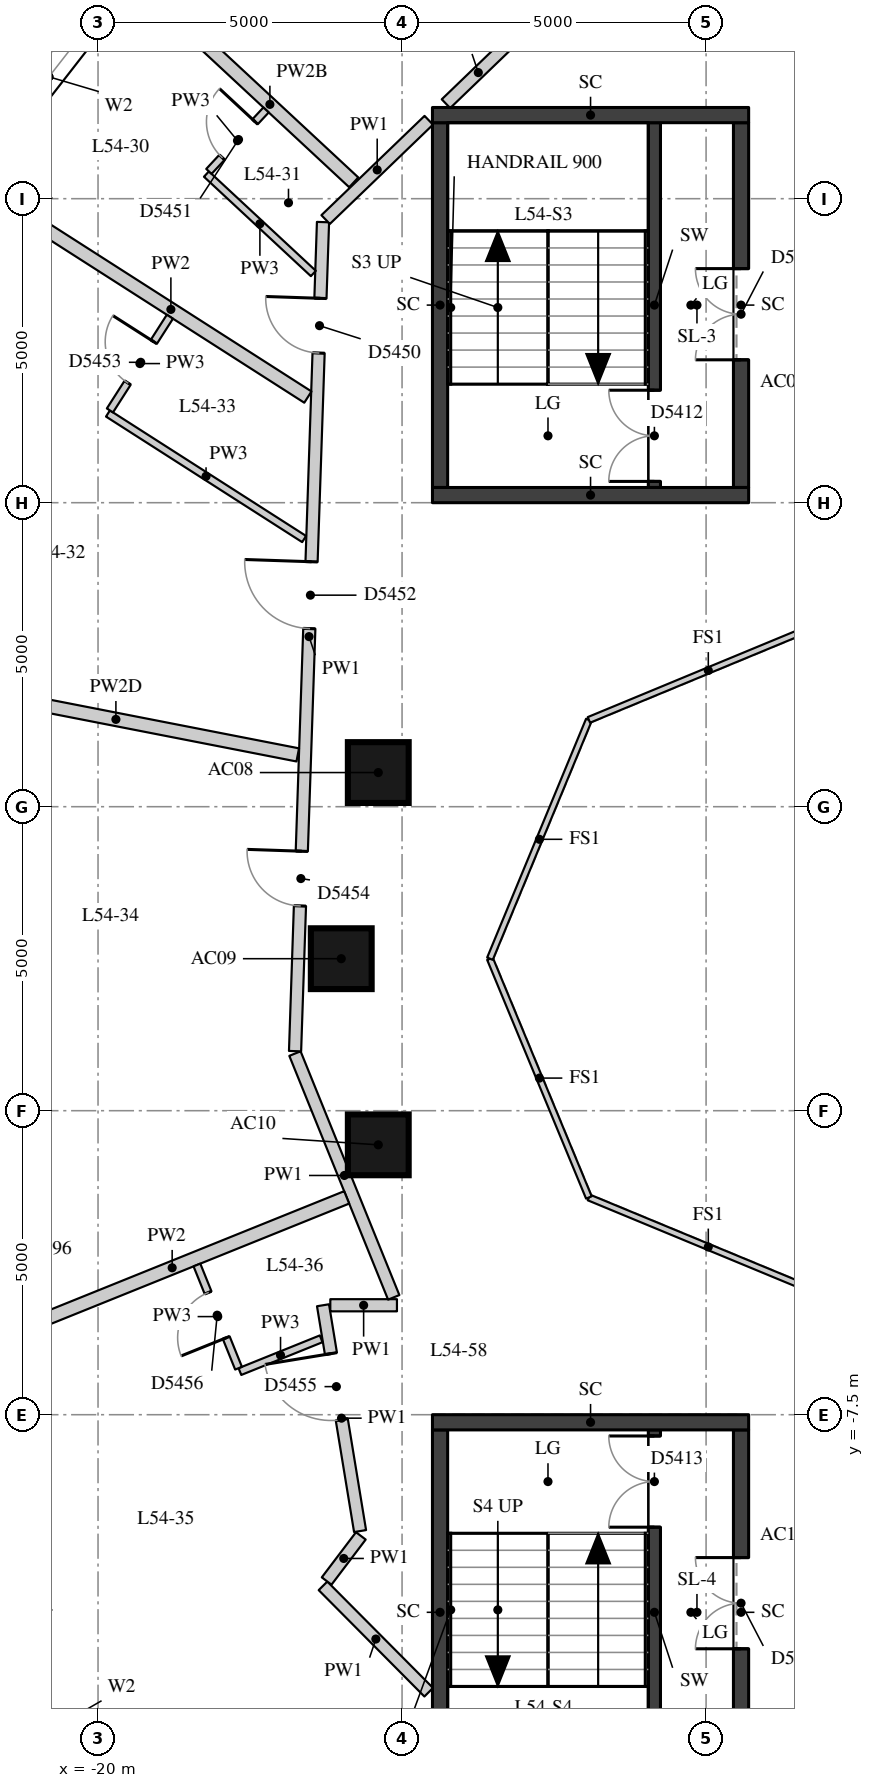
"""IFC4 building model, lengths in metres.
Left out: names, types, materials, properties, quantities, classifications, styles, units other than length and angle.
Written with IfcOpenShell. Run it as: python <this file> out.ifc"""

import sys

from ifc_helpers import new_model, si_unit, direction, frame, frame_2d, origin, origin_2d, place, context, subcontext, project, spatial, rectangle, extrude, element, fill, save


model = new_model("IFC4")
c1 = context("Model", 3, precision=1e-05, world=origin(), true_north=direction((0.0, 1.0)))
c2 = subcontext(c1, "Body", "Model", "MODEL_VIEW")
j1 = project(units=[si_unit("LENGTHUNIT", "METRE"), si_unit("PLANEANGLEUNIT", "RADIAN")], contexts=[c1])
p1 = place(None, origin())
s1 = spatial("IfcSite", under=j1, at=p1, CompositionType="ELEMENT")
p2 = place(p1, origin())
s2 = spatial("IfcBuilding", under=s1, at=p2, CompositionType="ELEMENT")
p3 = place(p2, frame((0.0, 0.0, 192.5)))
s3 = spatial("IfcBuildingStorey", under=s2, at=p3, CompositionType="ELEMENT", Elevation=192.5)
for number, where, z_axis, x_axis in (
    (1, (-15.391, 3.062, 0.0), (0.0, 0.0, 1.0), (1.0, 0.0, 0.0)),
    (2, (-16.0, 0.0, 0.0), (0.0, 0.0, 1.0), (1.0, 0.0, 0.0)),
    (3, (-15.391, -3.062, 0.0), (0.0, 0.0, 1.0), (1.0, 0.0, 0.0)),
):
    element("IfcColumn", number, at=place(p3, frame(where, z_axis=z_axis, x_axis=x_axis)), inside=s3, PredefinedType="COLUMN", context=c2, shape_type="SweptSolid", body=[
        extrude(rectangle(XDim=1.0, YDim=1.0, at=origin_2d()), origin(), (0.0, 0.0, 1.0), 3.3),
    ])
p4 = place(p3, frame((-19.751, 15.861, 0.0), z_axis=(0.0, 0.0, 1.0), x_axis=(-0.614220816451, -0.789134201919, 0.0)))
e4 = element("IfcWall", 4, at=p4, inside=s3, PredefinedType="SOLIDWALL", context=c2, shape_type="SweptSolid", body=[
    extrude(rectangle(XDim=3.438, YDim=0.45, at=frame_2d((1.719, 0.0))), origin(), (0.0, 0.0, 1.0), 3.02),
])
p5 = place(p4, frame((0.719, 0.0, 0.4)))
e5 = element("IfcOpeningElement", 5, at=p5, cuts=e4, PredefinedType="OPENING", context=c2, shape_type="SweptSolid", body=[
    extrude(rectangle(XDim=2.0, YDim=1.75, at=frame_2d((1.0, 0.875))), frame((0.0, 0.235, 0.0), z_axis=(0.0, -1.0, 0.0), x_axis=(1.0, 0.0, 0.0)), (0.0, 0.0, 1.0), 0.47),
])
p6 = place(p3, frame((-21.863, -11.348, 0.0), z_axis=(0.0, 0.0, 1.0), x_axis=(0.614255239631, -0.789107407509, 0.0)))
e6 = element("IfcWall", 6, at=p6, inside=s3, PredefinedType="SOLIDWALL", context=c2, shape_type="SweptSolid", body=[
    extrude(rectangle(XDim=3.438, YDim=0.45, at=frame_2d((1.719, 0.0))), origin(), (0.0, 0.0, 1.0), 3.02),
])
p7 = place(p6, frame((0.719, 0.0, 0.4)))
e7 = element("IfcOpeningElement", 7, at=p7, cuts=e6, PredefinedType="OPENING", context=c2, shape_type="SweptSolid", body=[
    extrude(rectangle(XDim=2.0, YDim=1.75, at=frame_2d((1.0, 0.875))), frame((0.0, 0.235, 0.0), z_axis=(0.0, -1.0, 0.0), x_axis=(1.0, 0.0, 0.0)), (0.0, 0.0, 1.0), 0.47),
])
p8 = place(p3, frame((-10.85, 7.75, 0.0), z_axis=(0.0, 0.0, 1.0), x_axis=(0.0, 1.0, 0.0)))
e8 = element("IfcWall", 8, at=p8, inside=s3, PredefinedType="SHEAR", context=c2, shape_type="SweptSolid", body=[
    extrude(rectangle(XDim=6.0, YDim=0.2, at=frame_2d((3.0, 0.0))), origin(), (0.0, 0.0, 1.0), 3.02),
])
p9 = place(p8, frame((0.1, 0.0, 0.0)))
e9 = element("IfcOpeningElement", 9, at=p9, cuts=e8, PredefinedType="OPENING", context=c2, shape_type="SweptSolid", body=[
    extrude(rectangle(XDim=1.5, YDim=2.1, at=frame_2d((0.75, 1.05))), frame((0.0, 0.11, 0.0), z_axis=(0.0, -1.0, 0.0), x_axis=(1.0, 0.0, 0.0)), (0.0, 0.0, 1.0), 0.22),
])
p10 = place(p3, frame((-10.85, -13.75, 0.0), z_axis=(0.0, 0.0, 1.0), x_axis=(0.0, 1.0, 0.0)))
e10 = element("IfcWall", 10, at=p10, inside=s3, PredefinedType="SHEAR", context=c2, shape_type="SweptSolid", body=[
    extrude(rectangle(XDim=6.0, YDim=0.2, at=frame_2d((3.0, 0.0))), origin(), (0.0, 0.0, 1.0), 3.02),
])
p11 = place(p10, frame((4.4, 0.0, 0.0)))
e11 = element("IfcOpeningElement", 11, at=p11, cuts=e10, PredefinedType="OPENING", context=c2, shape_type="SweptSolid", body=[
    extrude(rectangle(XDim=1.5, YDim=2.1, at=frame_2d((0.75, 1.05))), frame((0.0, 0.11, 0.0), z_axis=(0.0, -1.0, 0.0), x_axis=(1.0, 0.0, 0.0)), (0.0, 0.0, 1.0), 0.22),
])
p12 = place(p3, frame((-14.375, 7.75, -0.28), z_axis=(0.0, 0.0, 1.0), x_axis=(0.0, 1.0, 0.0)))
e12 = element("IfcWall", 12, at=p12, inside=s3, PredefinedType="SHEAR", context=c2, shape_type="SweptSolid", body=[
    extrude(rectangle(XDim=6.0, YDim=0.25, at=frame_2d((3.0, 0.0))), origin(), (0.0, 0.0, 1.0), 3.3),
])
p13 = place(p3, frame((-9.425, 7.75, -0.28), z_axis=(0.0, 0.0, 1.0), x_axis=(0.0, 1.0, 0.0)))
e13 = element("IfcWall", 13, at=p13, inside=s3, PredefinedType="SHEAR", context=c2, shape_type="SweptSolid", body=[
    extrude(rectangle(XDim=6.0, YDim=0.25, at=frame_2d((3.0, 0.0))), origin(), (0.0, 0.0, 1.0), 3.3),
])
p14 = place(p13, frame((2.1, 0.0, 0.28)))
e14 = element("IfcOpeningElement", 14, at=p14, cuts=e13, PredefinedType="OPENING", context=c2, shape_type="SweptSolid", body=[
    extrude(rectangle(XDim=1.5, YDim=2.1, at=frame_2d((0.75, 1.05))), frame((0.0, 0.135, 0.0), z_axis=(0.0, -1.0, 0.0), x_axis=(1.0, 0.0, 0.0)), (0.0, 0.0, 1.0), 0.27),
])
for number, where, z_axis, x_axis in (
    (15, (-14.5, 13.875, -0.28), (0.0, 0.0, 1.0), (1.0, 0.0, 0.0)),
    (16, (-14.5, 7.625, -0.28), (0.0, 0.0, 1.0), (1.0, 0.0, 0.0)),
):
    element("IfcWall", number, at=place(p3, frame(where, z_axis=z_axis, x_axis=x_axis)), inside=s3, PredefinedType="SHEAR", context=c2, shape_type="SweptSolid", body=[
        extrude(rectangle(XDim=5.2, YDim=0.25, at=frame_2d((2.6, 0.0))), origin(), (0.0, 0.0, 1.0), 3.3),
    ])
p15 = place(p3, frame((-14.375, -13.75, -0.28), z_axis=(0.0, 0.0, 1.0), x_axis=(0.0, 1.0, 0.0)))
e17 = element("IfcWall", 17, at=p15, inside=s3, PredefinedType="SHEAR", context=c2, shape_type="SweptSolid", body=[
    extrude(rectangle(XDim=6.0, YDim=0.25, at=frame_2d((3.0, 0.0))), origin(), (0.0, 0.0, 1.0), 3.3),
])
p16 = place(p3, frame((-9.425, -13.75, -0.28), z_axis=(0.0, 0.0, 1.0), x_axis=(0.0, 1.0, 0.0)))
e18 = element("IfcWall", 18, at=p16, inside=s3, PredefinedType="SHEAR", context=c2, shape_type="SweptSolid", body=[
    extrude(rectangle(XDim=6.0, YDim=0.25, at=frame_2d((3.0, 0.0))), origin(), (0.0, 0.0, 1.0), 3.3),
])
p17 = place(p16, frame((2.4, 0.0, 0.28)))
e19 = element("IfcOpeningElement", 19, at=p17, cuts=e18, PredefinedType="OPENING", context=c2, shape_type="SweptSolid", body=[
    extrude(rectangle(XDim=1.5, YDim=2.1, at=frame_2d((0.75, 1.05))), frame((0.0, 0.135, 0.0), z_axis=(0.0, -1.0, 0.0), x_axis=(1.0, 0.0, 0.0)), (0.0, 0.0, 1.0), 0.27),
])
p18 = place(p3, frame((-14.5, -7.625, -0.28), z_axis=(0.0, 0.0, 1.0), x_axis=(1.0, 0.0, 0.0)))
e20 = element("IfcWall", 20, at=p18, inside=s3, PredefinedType="SHEAR", context=c2, shape_type="SweptSolid", body=[
    extrude(rectangle(XDim=5.2, YDim=0.25, at=frame_2d((2.6, 0.0))), origin(), (0.0, 0.0, 1.0), 3.3),
])
p19 = place(p3, frame((-14.562, -12.064, 0.0), z_axis=(0.0, 0.0, 1.0), x_axis=(-0.704826289083, 0.709379942074, 0.0)))
e21 = element("IfcWall", 21, at=p19, inside=s3, PredefinedType="PARTITIONING", context=c2, shape_type="SweptSolid", body=[
    extrude(rectangle(XDim=2.466, YDim=0.2, at=frame_2d((1.233, 0.0))), origin(), (0.0, 0.0, 1.0), 3.02),
])
p20 = place(p3, frame((-16.24, -10.236, 0.0), z_axis=(0.0, 0.0, 1.0), x_axis=(0.60389301212, 0.797065386222, 0.0)))
e22 = element("IfcWall", 22, at=p20, inside=s3, PredefinedType="PARTITIONING", context=c2, shape_type="SweptSolid", body=[
    extrude(rectangle(XDim=0.931, YDim=0.2, at=frame_2d((0.466, 0.0))), origin(), (0.0, 0.0, 1.0), 3.02),
])
p21 = place(p3, frame((-15.69, -9.414, 0.0), z_axis=(0.0, 0.0, 1.0), x_axis=(-0.161968669214, 0.986795900981, 0.0)))
e23 = element("IfcWall", 23, at=p21, inside=s3, PredefinedType="PARTITIONING", context=c2, shape_type="SweptSolid", body=[
    extrude(rectangle(XDim=3.764, YDim=0.2, at=frame_2d((1.882, 0.0))), origin(), (0.0, 0.0, 1.0), 3.02),
])
p22 = place(p21, frame((1.858, 0.0, 0.0)))
e24 = element("IfcOpeningElement", 24, at=p22, cuts=e23, PredefinedType="OPENING", context=c2, shape_type="SweptSolid", body=[
    extrude(rectangle(XDim=1.1, YDim=2.1, at=frame_2d((0.55, 1.05))), frame((0.0, 0.11, 0.0), z_axis=(0.0, -1.0, 0.0), x_axis=(1.0, 0.0, 0.0)), (0.0, 0.0, 1.0), 0.22),
])
p23 = place(p3, frame((-16.18, -5.7, 0.0), z_axis=(0.0, 0.0, 1.0), x_axis=(1.0, 0.0, 0.0)))
e25 = element("IfcWall", 25, at=p23, inside=s3, PredefinedType="PARTITIONING", context=c2, shape_type="SweptSolid", body=[
    extrude(rectangle(XDim=1.096, YDim=0.2, at=frame_2d((0.548, 0.0))), origin(), (0.0, 0.0, 1.0), 3.02),
])
p24 = place(p3, frame((-15.137, -5.57, 0.0), z_axis=(0.0, 0.0, 1.0), x_axis=(-0.375464059939, 0.926836954213, 0.0)))
e26 = element("IfcWall", 26, at=p24, inside=s3, PredefinedType="PARTITIONING", context=c2, shape_type="SweptSolid", body=[
    extrude(rectangle(XDim=4.326, YDim=0.2, at=frame_2d((2.163, 0.0))), origin(), (0.0, 0.0, 1.0), 3.02),
])
p25 = place(p3, frame((-16.76, -1.521, 0.0), z_axis=(0.0, 0.0, 1.0), x_axis=(0.033695560079, 0.999432143385, 0.0)))
e27 = element("IfcWall", 27, at=p25, inside=s3, PredefinedType="PARTITIONING", context=c2, shape_type="SweptSolid", body=[
    extrude(rectangle(XDim=13.643, YDim=0.2, at=frame_2d((6.822, 0.0))), origin(), (0.0, 0.0, 1.0), 3.02),
])
p26 = place(p25, frame((11.489, 0.0, 0.0)))
e28 = element("IfcOpeningElement", 28, at=p26, cuts=e27, PredefinedType="OPENING", context=c2, shape_type="SweptSolid", body=[
    extrude(rectangle(XDim=0.9, YDim=2.1, at=frame_2d((0.45, 1.05))), frame((0.0, 0.11, 0.0), z_axis=(0.0, -1.0, 0.0), x_axis=(1.0, 0.0, 0.0)), (0.0, 0.0, 1.0), 0.22),
])
p27 = place(p25, frame((6.954, 0.0, 0.0)))
e29 = element("IfcOpeningElement", 29, at=p27, cuts=e27, PredefinedType="OPENING", context=c2, shape_type="SweptSolid", body=[
    extrude(rectangle(XDim=1.1, YDim=2.1, at=frame_2d((0.55, 1.05))), frame((0.0, 0.11, 0.0), z_axis=(0.0, -1.0, 0.0), x_axis=(1.0, 0.0, 0.0)), (0.0, 0.0, 1.0), 0.22),
])
p28 = place(p25, frame((2.39, 0.0, 0.0)))
e30 = element("IfcOpeningElement", 30, at=p28, cuts=e27, PredefinedType="OPENING", context=c2, shape_type="SweptSolid", body=[
    extrude(rectangle(XDim=0.9, YDim=2.1, at=frame_2d((0.45, 1.05))), frame((0.0, 0.11, 0.0), z_axis=(0.0, -1.0, 0.0), x_axis=(1.0, 0.0, 0.0)), (0.0, 0.0, 1.0), 0.22),
])
p29 = place(p3, frame((-16.257, 12.157, 0.0), z_axis=(0.0, 0.0, 1.0), x_axis=(0.720356671174, 0.693603825174, 0.0)))
e31 = element("IfcWall", 31, at=p29, inside=s3, PredefinedType="PARTITIONING", context=c2, shape_type="SweptSolid", body=[
    extrude(rectangle(XDim=2.354, YDim=0.2, at=frame_2d((1.177, 0.0))), origin(), (0.0, 0.0, 1.0), 3.02),
])
p30 = place(p3, frame((-14.278, 14.062, 0.0), z_axis=(0.0, 0.0, 1.0), x_axis=(0.720213092954, 0.693752910435, 0.0)))
e32 = element("IfcWall", 32, at=p30, inside=s3, PredefinedType="PARTITIONING", context=c2, shape_type="SweptSolid", body=[
    extrude(rectangle(XDim=1.476, YDim=0.2, at=frame_2d((0.738, 0.0))), origin(), (0.0, 0.0, 1.0), 3.02),
])
p31 = place(p3, frame((-18.553, 15.334, 0.0), z_axis=(0.0, 0.0, 1.0), x_axis=(0.732303975018, -0.680977891105, 0.0)))
e33 = element("IfcWall", 33, at=p31, inside=s3, PredefinedType="PARTITIONING", context=c2, shape_type="SweptSolid", body=[
    extrude(rectangle(XDim=3.767, YDim=0.22, at=frame_2d((1.884, 0.0))), origin(), (0.0, 0.0, 1.0), 2.57),
])
p32 = place(p3, frame((-21.055, 12.121, 0.0), z_axis=(0.0, 0.0, 1.0), x_axis=(0.842281345898, -0.539038156675, 0.0)))
e34 = element("IfcWall", 34, at=p32, inside=s3, PredefinedType="PARTITIONING", context=c2, shape_type="SweptSolid", body=[
    extrude(rectangle(XDim=5.35, YDim=0.22, at=frame_2d((2.675, 0.0))), origin(), (0.0, 0.0, 1.0), 3.02),
])
p33 = place(p3, frame((-22.697, 4.521, 0.0), z_axis=(0.0, 0.0, 1.0), x_axis=(0.981441525081, -0.19176165635, 0.0)))
e35 = element("IfcWall", 35, at=p33, inside=s3, PredefinedType="PARTITIONING", context=c2, shape_type="SweptSolid", body=[
    extrude(rectangle(XDim=6.094, YDim=0.22, at=frame_2d((3.047, 0.0))), origin(), (0.0, 0.0, 1.0), 2.47),
])
p34 = place(p3, frame((-21.651, -6.241, 0.0), z_axis=(0.0, 0.0, 1.0), x_axis=(0.927381885483, 0.374116076208, 0.0)))
e36 = element("IfcWall", 36, at=p34, inside=s3, PredefinedType="PARTITIONING", context=c2, shape_type="SweptSolid", body=[
    extrude(rectangle(XDim=6.19, YDim=0.22, at=frame_2d((3.095, 0.0))), origin(), (0.0, 0.0, 1.0), 3.02),
])
p35 = place(p3, frame((-16.459, 11.27, 0.0), z_axis=(0.0, 0.0, 1.0), x_axis=(-0.732311710068, 0.68096957296, 0.0)))
e37 = element("IfcWall", 37, at=p35, inside=s3, PredefinedType="PARTITIONING", context=c2, shape_type="SweptSolid", body=[
    extrude(rectangle(XDim=2.401, YDim=0.12, at=frame_2d((1.201, 0.0))), origin(), (0.0, 0.0, 1.0), 3.02),
])
p36 = place(p3, frame((-16.61, 6.902, 0.0), z_axis=(0.0, 0.0, 1.0), x_axis=(-0.842288763401, 0.539026566181, 0.0)))
e38 = element("IfcWall", 38, at=p36, inside=s3, PredefinedType="PARTITIONING", context=c2, shape_type="SweptSolid", body=[
    extrude(rectangle(XDim=3.83, YDim=0.12, at=frame_2d((1.915, 0.0))), origin(), (0.0, 0.0, 1.0), 3.02),
])
p37 = place(p3, frame((-16.331, -6.252, 0.0), z_axis=(0.0, 0.0, 1.0), x_axis=(-0.927409233125, -0.374048278053, 0.0)))
e39 = element("IfcWall", 39, at=p37, inside=s3, PredefinedType="PARTITIONING", context=c2, shape_type="SweptSolid", body=[
    extrude(rectangle(XDim=1.44, YDim=0.12, at=frame_2d((0.72, 0.0))), origin(), (0.0, 0.0, 1.0), 3.02),
])
p38 = place(p3, frame((-18.177, 12.949, 0.0), z_axis=(0.0, 0.0, 1.0), x_axis=(0.681081886823, 0.732207254431, 0.0)))
e40 = element("IfcWall", 40, at=p38, inside=s3, PredefinedType="PARTITIONING", context=c2, shape_type="SweptSolid", body=[
    extrude(rectangle(XDim=1.38, YDim=0.12, at=frame_2d((0.69, 0.0))), origin(), (0.0, 0.0, 1.0), 3.02),
])
p39 = place(p38, frame((0.315, 0.0, 0.0)))
e41 = element("IfcOpeningElement", 41, at=p39, cuts=e40, PredefinedType="OPENING", context=c2, shape_type="SweptSolid", body=[
    extrude(rectangle(XDim=0.8, YDim=2.1, at=frame_2d((0.4, 1.05))), frame((0.0, 0.07, 0.0), z_axis=(0.0, -1.0, 0.0), x_axis=(1.0, 0.0, 0.0)), (0.0, 0.0, 1.0), 0.14),
])
p40 = place(p3, frame((-19.804, 9.017, 0.0), z_axis=(0.0, 0.0, 1.0), x_axis=(0.538962837458, 0.842329543492, 0.0)))
e42 = element("IfcWall", 42, at=p40, inside=s3, PredefinedType="PARTITIONING", context=c2, shape_type="SweptSolid", body=[
    extrude(rectangle(XDim=1.83, YDim=0.12, at=frame_2d((0.915, 0.0))), origin(), (0.0, 0.0, 1.0), 3.02),
])
p41 = place(p40, frame((0.54, 0.0, 0.0)))
e43 = element("IfcOpeningElement", 43, at=p41, cuts=e42, PredefinedType="OPENING", context=c2, shape_type="SweptSolid", body=[
    extrude(rectangle(XDim=0.8, YDim=2.1, at=frame_2d((0.4, 1.05))), frame((0.0, 0.07, 0.0), z_axis=(0.0, -1.0, 0.0), x_axis=(1.0, 0.0, 0.0)), (0.0, 0.0, 1.0), 0.14),
])
p42 = place(p3, frame((-17.689, -6.735, 0.0), z_axis=(0.0, 0.0, 1.0), x_axis=(-0.374057168462, 0.927405647342, 0.0)))
e44 = element("IfcWall", 44, at=p42, inside=s3, PredefinedType="PARTITIONING", context=c2, shape_type="SweptSolid", body=[
    extrude(rectangle(XDim=1.83, YDim=0.12, at=frame_2d((0.915, 0.0))), origin(), (0.0, 0.0, 1.0), 3.02),
])
p43 = place(p42, frame((0.54, 0.0, 0.0)))
e45 = element("IfcOpeningElement", 45, at=p43, cuts=e44, PredefinedType="OPENING", context=c2, shape_type="SweptSolid", body=[
    extrude(rectangle(XDim=0.8, YDim=2.1, at=frame_2d((0.4, 1.05))), frame((0.0, 0.07, 0.0), z_axis=(0.0, -1.0, 0.0), x_axis=(1.0, 0.0, 0.0)), (0.0, 0.0, 1.0), 0.14),
])
for number, where, z_axis, x_axis in (
    (46, (-8.0, -5.554, 0.0), (0.0, 0.0, 1.0), (-0.924, 0.383, 0.0)),
    (47, (-11.927, -3.927, 0.0), (0.0, 0.0, 1.0), (-0.383, 0.924, 0.0)),
    (48, (-13.554, 0.0, 0.0), (0.0, 0.0, 1.0), (0.383, 0.924, 0.0)),
    (49, (-11.927, 3.927, 0.0), (0.0, 0.0, 1.0), (0.924, 0.383, 0.0)),
):
    element("IfcWall", number, at=place(p3, frame(where, z_axis=z_axis, x_axis=x_axis)), inside=s3, PredefinedType="PARTITIONING", context=c2, shape_type="SweptSolid", body=[
        extrude(rectangle(XDim=4.251, YDim=0.1, at=frame_2d((2.125, 0.0))), origin(), (0.0, 0.0, 1.0), 3.02),
    ])
p44 = place(p5, origin())
e50 = element("IfcWindow", 50, at=p44, inside=s3, PartitioningType="SINGLE_PANEL", PredefinedType="WINDOW", context=c2, shape_type="SweptSolid", body=[
    extrude(rectangle(XDim=2.0, YDim=1.75, at=frame_2d((1.0, 0.875))), frame((0.0, 0.035, 0.0), z_axis=(0.0, -1.0, 0.0), x_axis=(1.0, 0.0, 0.0)), (0.0, 0.0, 1.0), 0.06),
])
fill(e5, e50)
p45 = place(p7, origin())
e51 = element("IfcWindow", 51, at=p45, inside=s3, PartitioningType="SINGLE_PANEL", PredefinedType="WINDOW", context=c2, shape_type="SweptSolid", body=[
    extrude(rectangle(XDim=2.0, YDim=1.75, at=frame_2d((1.0, 0.875))), frame((0.0, 0.035, 0.0), z_axis=(0.0, -1.0, 0.0), x_axis=(1.0, 0.0, 0.0)), (0.0, 0.0, 1.0), 0.06),
])
fill(e7, e51)
p46 = place(p9, origin())
e52 = element("IfcDoor", 52, at=p46, inside=s3, OperationType="DOUBLE_DOOR_SINGLE_SWING", PredefinedType="DOOR", context=c2, shape_type="SweptSolid", body=[
    extrude(rectangle(XDim=1.5, YDim=2.1, at=frame_2d((0.75, 1.05))), frame((0.0, 0.025, 0.0), z_axis=(0.0, -1.0, 0.0), x_axis=(1.0, 0.0, 0.0)), (0.0, 0.0, 1.0), 0.05),
])
fill(e9, e52)
p47 = place(p11, origin())
e53 = element("IfcDoor", 53, at=p47, inside=s3, OperationType="DOUBLE_DOOR_SINGLE_SWING", PredefinedType="DOOR", context=c2, shape_type="SweptSolid", body=[
    extrude(rectangle(XDim=1.5, YDim=2.1, at=frame_2d((0.75, 1.05))), frame((0.0, 0.025, 0.0), z_axis=(0.0, -1.0, 0.0), x_axis=(1.0, 0.0, 0.0)), (0.0, 0.0, 1.0), 0.05),
])
fill(e11, e53)
p48 = place(p14, origin())
e54 = element("IfcDoor", 54, at=p48, inside=s3, OperationType="DOUBLE_DOOR_SINGLE_SWING", PredefinedType="DOOR", context=c2, shape_type="SweptSolid", body=[
    extrude(rectangle(XDim=1.5, YDim=2.1, at=frame_2d((0.75, 1.05))), frame((0.0, 0.025, 0.0), z_axis=(0.0, -1.0, 0.0), x_axis=(1.0, 0.0, 0.0)), (0.0, 0.0, 1.0), 0.05),
])
fill(e14, e54)
p49 = place(p17, origin())
e55 = element("IfcDoor", 55, at=p49, inside=s3, OperationType="DOUBLE_DOOR_SINGLE_SWING", PredefinedType="DOOR", context=c2, shape_type="SweptSolid", body=[
    extrude(rectangle(XDim=1.5, YDim=2.1, at=frame_2d((0.75, 1.05))), frame((0.0, 0.025, 0.0), z_axis=(0.0, -1.0, 0.0), x_axis=(1.0, 0.0, 0.0)), (0.0, 0.0, 1.0), 0.05),
])
fill(e19, e55)
p50 = place(p26, origin())
e56 = element("IfcDoor", 56, at=p50, inside=s3, OperationType="SINGLE_SWING_RIGHT", PredefinedType="DOOR", context=c2, shape_type="SweptSolid", body=[
    extrude(rectangle(XDim=0.9, YDim=2.1, at=frame_2d((0.45, 1.05))), frame((0.0, 0.025, 0.0), z_axis=(0.0, -1.0, 0.0), x_axis=(1.0, 0.0, 0.0)), (0.0, 0.0, 1.0), 0.05),
])
fill(e28, e56)
p51 = place(p39, origin())
e57 = element("IfcDoor", 57, at=p51, inside=s3, OperationType="SINGLE_SWING_RIGHT", PredefinedType="DOOR", context=c2, shape_type="SweptSolid", body=[
    extrude(rectangle(XDim=0.8, YDim=2.1, at=frame_2d((0.4, 1.05))), frame((0.0, 0.025, 0.0), z_axis=(0.0, -1.0, 0.0), x_axis=(1.0, 0.0, 0.0)), (0.0, 0.0, 1.0), 0.05),
])
fill(e41, e57)
p52 = place(p27, origin())
e58 = element("IfcDoor", 58, at=p52, inside=s3, OperationType="SINGLE_SWING_RIGHT", PredefinedType="DOOR", context=c2, shape_type="SweptSolid", body=[
    extrude(rectangle(XDim=1.1, YDim=2.1, at=frame_2d((0.55, 1.05))), frame((0.0, 0.025, 0.0), z_axis=(0.0, -1.0, 0.0), x_axis=(1.0, 0.0, 0.0)), (0.0, 0.0, 1.0), 0.05),
])
fill(e29, e58)
p53 = place(p41, origin())
e59 = element("IfcDoor", 59, at=p53, inside=s3, OperationType="SINGLE_SWING_RIGHT", PredefinedType="DOOR", context=c2, shape_type="SweptSolid", body=[
    extrude(rectangle(XDim=0.8, YDim=2.1, at=frame_2d((0.4, 1.05))), frame((0.0, 0.025, 0.0), z_axis=(0.0, -1.0, 0.0), x_axis=(1.0, 0.0, 0.0)), (0.0, 0.0, 1.0), 0.05),
])
fill(e43, e59)
p54 = place(p28, origin())
e60 = element("IfcDoor", 60, at=p54, inside=s3, OperationType="SINGLE_SWING_RIGHT", PredefinedType="DOOR", context=c2, shape_type="SweptSolid", body=[
    extrude(rectangle(XDim=0.9, YDim=2.1, at=frame_2d((0.45, 1.05))), frame((0.0, 0.025, 0.0), z_axis=(0.0, -1.0, 0.0), x_axis=(1.0, 0.0, 0.0)), (0.0, 0.0, 1.0), 0.05),
])
fill(e30, e60)
p55 = place(p22, origin())
e61 = element("IfcDoor", 61, at=p55, inside=s3, OperationType="SINGLE_SWING_RIGHT", PredefinedType="DOOR", context=c2, shape_type="SweptSolid", body=[
    extrude(rectangle(XDim=1.1, YDim=2.1, at=frame_2d((0.55, 1.05))), frame((0.0, 0.025, 0.0), z_axis=(0.0, -1.0, 0.0), x_axis=(1.0, 0.0, 0.0)), (0.0, 0.0, 1.0), 0.05),
])
fill(e24, e61)
p56 = place(p43, origin())
e62 = element("IfcDoor", 62, at=p56, inside=s3, OperationType="SINGLE_SWING_LEFT", PredefinedType="DOOR", context=c2, shape_type="SweptSolid", body=[
    extrude(rectangle(XDim=0.8, YDim=2.1, at=frame_2d((0.4, 1.05))), frame((0.0, 0.025, 0.0), z_axis=(0.0, -1.0, 0.0), x_axis=(1.0, 0.0, 0.0)), (0.0, 0.0, 1.0), 0.05),
])
fill(e45, e62)
save(model, sys.argv[1])
